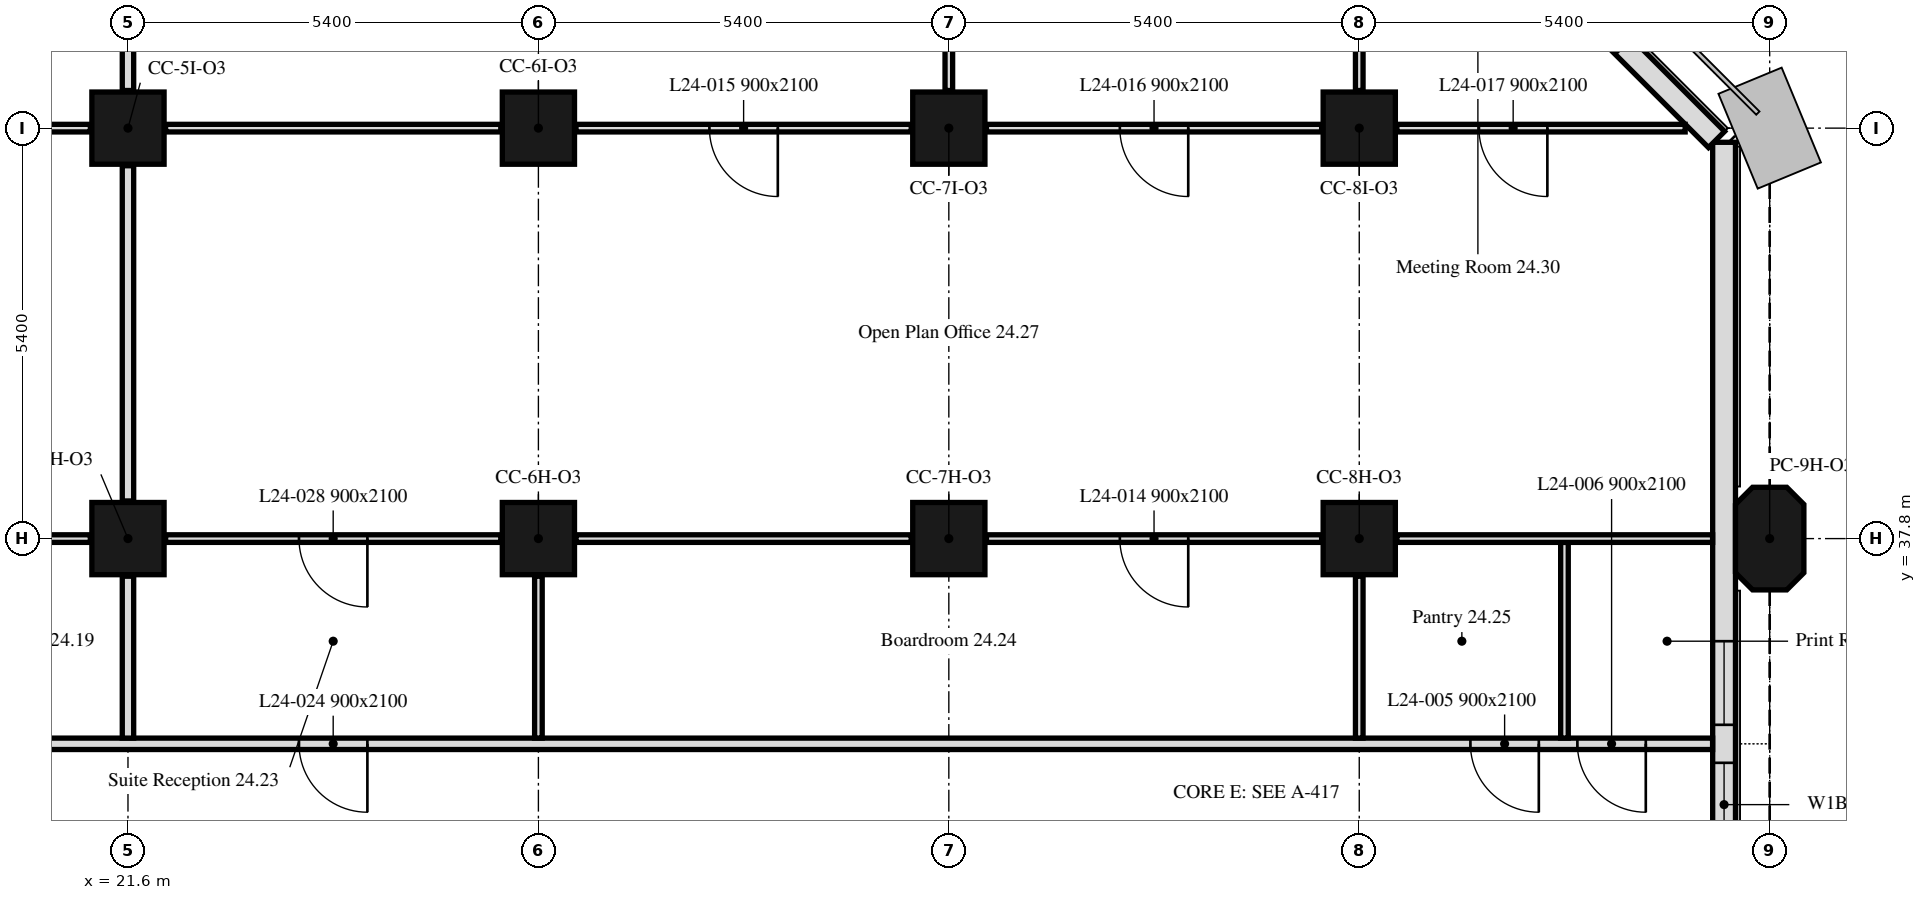
"""IFC4 building model, lengths in metres.
Left out: names, types, materials, properties, quantities, classifications, styles, units other than length and angle.
Written with IfcOpenShell. Run it as: python <this file> out.ifc"""

import sys

from ifc_helpers import new_model, si_unit, direction, frame, frame_2d, origin, origin_2d, place, context, subcontext, project, spatial, polyline, rectangle, outline, extrude, element, fill, save


model = new_model("IFC4")
c1 = context("Model", 3, precision=1e-05, world=origin(), true_north=direction((0.0, 1.0)))
c2 = subcontext(c1, "Body", "Model", "MODEL_VIEW")
j1 = project(units=[si_unit("LENGTHUNIT", "METRE"), si_unit("PLANEANGLEUNIT", "RADIAN")], contexts=[c1])
p1 = place(None, origin())
s1 = spatial("IfcSite", under=j1, at=p1, CompositionType="ELEMENT")
p2 = place(p1, origin())
s2 = spatial("IfcBuilding", under=s1, at=p2, CompositionType="ELEMENT")
p3 = place(p2, frame((0.0, 0.0, 103.0)))
s3 = spatial("IfcBuildingStorey", under=s2, at=p3, CompositionType="ELEMENT", Elevation=103.0)
for number, where, z_axis, x_axis in (
    (1, (21.6, 37.8, 0.0), (0.0, 0.0, 1.0), (1.0, 0.0, 0.0)),
    (2, (27.0, 37.8, 0.0), (0.0, 0.0, 1.0), (1.0, 0.0, 0.0)),
    (3, (32.4, 37.8, 0.0), (0.0, 0.0, 1.0), (1.0, 0.0, 0.0)),
    (4, (37.8, 37.8, 0.0), (0.0, 0.0, 1.0), (1.0, 0.0, 0.0)),
):
    element("IfcColumn", number, at=place(p3, frame(where, z_axis=z_axis, x_axis=x_axis)), inside=s3, PredefinedType="COLUMN", context=c2, shape_type="SweptSolid", body=[
        extrude(rectangle(XDim=0.95, YDim=0.95, at=origin_2d()), origin(), (0.0, 0.0, 1.0), 3.5),
    ])
p4 = place(p3, frame((43.2, 37.8, 0.0), z_axis=(0.0, 0.0, 1.0), x_axis=(0.0, 1.0, 0.0)))
e5 = element("IfcColumn", 5, at=p4, inside=s3, PredefinedType="COLUMN", context=c2, shape_type="SweptSolid", body=[
    extrude(outline(polyline([(-0.45, -0.45), (0.45, -0.45), (0.675, -0.225), (0.675, 0.225), (0.45, 0.45), (-0.45, 0.45), (-0.675, 0.225), (-0.675, -0.225), (-0.45, -0.45)])), origin(), (0.0, 0.0, 1.0), 3.5),
])
for number, where, z_axis, x_axis in (
    (6, (21.6, 43.2, 0.0), (0.0, 0.0, 1.0), (1.0, 0.0, 0.0)),
    (7, (27.0, 43.2, 0.0), (0.0, 0.0, 1.0), (1.0, 0.0, 0.0)),
    (8, (32.4, 43.2, 0.0), (0.0, 0.0, 1.0), (1.0, 0.0, 0.0)),
    (9, (37.8, 43.2, 0.0), (0.0, 0.0, 1.0), (1.0, 0.0, 0.0)),
):
    element("IfcColumn", number, at=place(p3, frame(where, z_axis=z_axis, x_axis=x_axis)), inside=s3, PredefinedType="COLUMN", context=c2, shape_type="SweptSolid", body=[
        extrude(rectangle(XDim=0.95, YDim=0.95, at=origin_2d()), origin(), (0.0, 0.0, 1.0), 3.5),
    ])
p5 = place(p3, frame((42.6, 32.4, 0.0), z_axis=(0.0, 0.0, 1.0), x_axis=(0.0, 1.0, 0.0)))
e10 = element("IfcWall", 10, at=p5, inside=s3, PredefinedType="SOLIDWALL", context=c2, shape_type="SweptSolid", body=[
    extrude(rectangle(XDim=10.614, YDim=0.3, at=frame_2d((5.307, 0.0))), origin(), (0.0, 0.0, 1.0), 3.5),
])
p6 = place(p5, frame((1.35, 0.0, 0.9)))
e11 = element("IfcOpeningElement", 11, at=p6, cuts=e10, PredefinedType="OPENING", context=c2, shape_type="SweptSolid", body=[
    extrude(rectangle(XDim=1.1, YDim=1.7, at=frame_2d((0.55, 0.85))), frame((0.0, 0.16, 0.0), z_axis=(0.0, -1.0, 0.0), x_axis=(1.0, 0.0, 0.0)), (0.0, 0.0, 1.0), 0.32),
])
p7 = place(p5, frame((2.95, 0.0, 0.9)))
e12 = element("IfcOpeningElement", 12, at=p7, cuts=e10, PredefinedType="OPENING", context=c2, shape_type="SweptSolid", body=[
    extrude(rectangle(XDim=1.1, YDim=1.7, at=frame_2d((0.55, 0.85))), frame((0.0, 0.16, 0.0), z_axis=(0.0, -1.0, 0.0), x_axis=(1.0, 0.0, 0.0)), (0.0, 0.0, 1.0), 0.32),
])
p8 = place(p3, frame((42.501, 43.051, 0.0), z_axis=(0.0, 0.0, 1.0), x_axis=(-0.707106781187, 0.707106781187, 0.0)))
e13 = element("IfcWall", 13, at=p8, inside=s3, PredefinedType="SOLIDWALL", context=c2, shape_type="SweptSolid", body=[
    extrude(rectangle(XDim=6.86, YDim=0.3, at=frame_2d((3.43, 0.0))), origin(), (0.0, 0.0, 1.0), 3.5),
])
p9 = place(p8, frame((1.73, 0.0, 0.9)))
e14 = element("IfcOpeningElement", 14, at=p9, cuts=e13, PredefinedType="OPENING", context=c2, shape_type="SweptSolid", body=[
    extrude(rectangle(XDim=3.4, YDim=1.7, at=frame_2d((1.7, 0.85))), frame((0.0, 0.16, 0.0), z_axis=(0.0, -1.0, 0.0), x_axis=(1.0, 0.0, 0.0)), (0.0, 0.0, 1.0), 0.32),
])
p10 = place(p3, frame((42.449, 35.1, 0.0), z_axis=(0.0, 0.0, 1.0), x_axis=(-1.0, 0.0, 0.0)))
e15 = element("IfcWall", 15, at=p10, inside=s3, PredefinedType="PARTITIONING", context=c2, shape_type="SweptSolid", body=[
    extrude(rectangle(XDim=41.698, YDim=0.15, at=frame_2d((20.849, 0.0))), origin(), (0.0, 0.0, 1.0), 2.75),
])
p11 = place(p10, frame((34.519, 0.0, 0.0)))
e16 = element("IfcOpeningElement", 16, at=p11, cuts=e15, PredefinedType="OPENING", context=c2, shape_type="SweptSolid", body=[
    extrude(rectangle(XDim=0.9, YDim=2.1, at=frame_2d((0.45, 1.05))), frame((0.0, 0.075, 0.0), z_axis=(0.0, -1.0, 0.0), x_axis=(1.0, 0.0, 0.0)), (0.0, 0.0, 1.0), 0.15),
])
p12 = place(p10, frame((33.279, 0.0, 0.0)))
e17 = element("IfcOpeningElement", 17, at=p12, cuts=e15, PredefinedType="OPENING", context=c2, shape_type="SweptSolid", body=[
    extrude(rectangle(XDim=0.9, YDim=2.1, at=frame_2d((0.45, 1.05))), frame((0.0, 0.075, 0.0), z_axis=(0.0, -1.0, 0.0), x_axis=(1.0, 0.0, 0.0)), (0.0, 0.0, 1.0), 0.15),
])
p13 = place(p10, frame((23.719, 0.0, 0.0)))
e18 = element("IfcOpeningElement", 18, at=p13, cuts=e15, PredefinedType="OPENING", context=c2, shape_type="SweptSolid", body=[
    extrude(rectangle(XDim=0.9, YDim=2.1, at=frame_2d((0.45, 1.05))), frame((0.0, 0.075, 0.0), z_axis=(0.0, -1.0, 0.0), x_axis=(1.0, 0.0, 0.0)), (0.0, 0.0, 1.0), 0.15),
])
p14 = place(p10, frame((22.479, 0.0, 0.0)))
e19 = element("IfcOpeningElement", 19, at=p14, cuts=e15, PredefinedType="OPENING", context=c2, shape_type="SweptSolid", body=[
    extrude(rectangle(XDim=0.9, YDim=2.1, at=frame_2d((0.45, 1.05))), frame((0.0, 0.075, 0.0), z_axis=(0.0, -1.0, 0.0), x_axis=(1.0, 0.0, 0.0)), (0.0, 0.0, 1.0), 0.15),
])
p15 = place(p10, frame((2.287, 0.0, 0.0)))
e20 = element("IfcOpeningElement", 20, at=p15, cuts=e15, PredefinedType="OPENING", context=c2, shape_type="SweptSolid", body=[
    extrude(rectangle(XDim=0.9, YDim=2.1, at=frame_2d((0.45, 1.05))), frame((0.0, 0.075, 0.0), z_axis=(0.0, -1.0, 0.0), x_axis=(1.0, 0.0, 0.0)), (0.0, 0.0, 1.0), 0.15),
])
p16 = place(p10, frame((0.879, 0.0, 0.0)))
e21 = element("IfcOpeningElement", 21, at=p16, cuts=e15, PredefinedType="OPENING", context=c2, shape_type="SweptSolid", body=[
    extrude(rectangle(XDim=0.9, YDim=2.1, at=frame_2d((0.45, 1.05))), frame((0.0, 0.075, 0.0), z_axis=(0.0, -1.0, 0.0), x_axis=(1.0, 0.0, 0.0)), (0.0, 0.0, 1.0), 0.15),
])
p17 = place(p10, frame((38.624, 0.0, 0.0)))
e22 = element("IfcOpeningElement", 22, at=p17, cuts=e15, PredefinedType="OPENING", context=c2, shape_type="SweptSolid", body=[
    extrude(rectangle(XDim=0.9, YDim=2.1, at=frame_2d((0.45, 1.05))), frame((0.0, 0.075, 0.0), z_axis=(0.0, -1.0, 0.0), x_axis=(1.0, 0.0, 0.0)), (0.0, 0.0, 1.0), 0.15),
])
p18 = place(p10, frame((28.499, 0.0, 0.0)))
e23 = element("IfcOpeningElement", 23, at=p18, cuts=e15, PredefinedType="OPENING", context=c2, shape_type="SweptSolid", body=[
    extrude(rectangle(XDim=0.9, YDim=2.1, at=frame_2d((0.45, 1.05))), frame((0.0, 0.075, 0.0), z_axis=(0.0, -1.0, 0.0), x_axis=(1.0, 0.0, 0.0)), (0.0, 0.0, 1.0), 0.15),
])
p19 = place(p10, frame((17.699, 0.0, 0.0)))
e24 = element("IfcOpeningElement", 24, at=p19, cuts=e15, PredefinedType="OPENING", context=c2, shape_type="SweptSolid", body=[
    extrude(rectangle(XDim=0.9, YDim=2.1, at=frame_2d((0.45, 1.05))), frame((0.0, 0.075, 0.0), z_axis=(0.0, -1.0, 0.0), x_axis=(1.0, 0.0, 0.0)), (0.0, 0.0, 1.0), 0.15),
])
p20 = place(p3, frame((21.6, 35.175, 0.0), z_axis=(0.0, 0.0, 1.0), x_axis=(0.0, 1.0, 0.0)))
e25 = element("IfcWall", 25, at=p20, inside=s3, PredefinedType="PARTITIONING", context=c2, shape_type="SweptSolid", body=[
    extrude(rectangle(XDim=2.13, YDim=0.15, at=frame_2d((1.065, 0.0))), origin(), (0.0, 0.0, 1.0), 2.75),
])
p21 = place(p3, frame((21.105, 37.8, 0.0), z_axis=(0.0, 0.0, 1.0), x_axis=(-1.0, 0.0, 0.0)))
e26 = element("IfcWall", 26, at=p21, inside=s3, PredefinedType="PARTITIONING", context=c2, shape_type="SweptSolid", body=[
    extrude(rectangle(XDim=4.41, YDim=0.1, at=frame_2d((2.205, 0.0))), origin(), (0.0, 0.0, 1.0), 3.5),
])
p22 = place(p3, frame((21.6, 38.295, 0.0), z_axis=(0.0, 0.0, 1.0), x_axis=(0.0, 1.0, 0.0)))
e27 = element("IfcWall", 27, at=p22, inside=s3, PredefinedType="PARTITIONING", context=c2, shape_type="SweptSolid", body=[
    extrude(rectangle(XDim=4.41, YDim=0.15, at=frame_2d((2.205, 0.0))), origin(), (0.0, 0.0, 1.0), 2.75),
])
p23 = place(p3, frame((21.105, 43.2, 0.0), z_axis=(0.0, 0.0, 1.0), x_axis=(-1.0, 0.0, 0.0)))
e28 = element("IfcWall", 28, at=p23, inside=s3, PredefinedType="PARTITIONING", context=c2, shape_type="SweptSolid", body=[
    extrude(rectangle(XDim=4.41, YDim=0.1, at=frame_2d((2.205, 0.0))), origin(), (0.0, 0.0, 1.0), 3.5),
])
p24 = place(p23, frame((1.755, 0.0, 0.0)))
e29 = element("IfcOpeningElement", 29, at=p24, cuts=e28, PredefinedType="OPENING", context=c2, shape_type="SweptSolid", body=[
    extrude(rectangle(XDim=0.9, YDim=2.1, at=frame_2d((0.45, 1.05))), frame((0.0, 0.05, 0.0), z_axis=(0.0, -1.0, 0.0), x_axis=(1.0, 0.0, 0.0)), (0.0, 0.0, 1.0), 0.1),
])
p25 = place(p3, frame((21.6, 43.695, 0.0), z_axis=(0.0, 0.0, 1.0), x_axis=(0.0, 1.0, 0.0)))
e30 = element("IfcWall", 30, at=p25, inside=s3, PredefinedType="PARTITIONING", context=c2, shape_type="SweptSolid", body=[
    extrude(rectangle(XDim=4.154, YDim=0.15, at=frame_2d((2.077, 0.0))), origin(), (0.0, 0.0, 1.0), 2.75),
])
p26 = place(p3, frame((27.0, 35.175, 0.0), z_axis=(0.0, 0.0, 1.0), x_axis=(0.0, 1.0, 0.0)))
e31 = element("IfcWall", 31, at=p26, inside=s3, PredefinedType="PARTITIONING", context=c2, shape_type="SweptSolid", body=[
    extrude(rectangle(XDim=2.13, YDim=0.1, at=frame_2d((1.065, 0.0))), origin(), (0.0, 0.0, 1.0), 2.75),
])
p27 = place(p3, frame((26.505, 37.8, 0.0), z_axis=(0.0, 0.0, 1.0), x_axis=(-1.0, 0.0, 0.0)))
e32 = element("IfcWall", 32, at=p27, inside=s3, PredefinedType="PARTITIONING", context=c2, shape_type="SweptSolid", body=[
    extrude(rectangle(XDim=4.41, YDim=0.1, at=frame_2d((2.205, 0.0))), origin(), (0.0, 0.0, 1.0), 3.5),
])
p28 = place(p27, frame((1.755, 0.0, 0.0)))
e33 = element("IfcOpeningElement", 33, at=p28, cuts=e32, PredefinedType="OPENING", context=c2, shape_type="SweptSolid", body=[
    extrude(rectangle(XDim=0.9, YDim=2.1, at=frame_2d((0.45, 1.05))), frame((0.0, 0.05, 0.0), z_axis=(0.0, -1.0, 0.0), x_axis=(1.0, 0.0, 0.0)), (0.0, 0.0, 1.0), 0.1),
])
p29 = place(p3, frame((37.8, 35.175, 0.0), z_axis=(0.0, 0.0, 1.0), x_axis=(0.0, 1.0, 0.0)))
e34 = element("IfcWall", 34, at=p29, inside=s3, PredefinedType="PARTITIONING", context=c2, shape_type="SweptSolid", body=[
    extrude(rectangle(XDim=2.13, YDim=0.1, at=frame_2d((1.065, 0.0))), origin(), (0.0, 0.0, 1.0), 3.5),
])
p30 = place(p3, frame((37.305, 37.8, 0.0), z_axis=(0.0, 0.0, 1.0), x_axis=(-1.0, 0.0, 0.0)))
e35 = element("IfcWall", 35, at=p30, inside=s3, PredefinedType="PARTITIONING", context=c2, shape_type="SweptSolid", body=[
    extrude(rectangle(XDim=4.41, YDim=0.1, at=frame_2d((2.205, 0.0))), origin(), (0.0, 0.0, 1.0), 3.5),
])
p31 = place(p30, frame((1.755, 0.0, 0.0)))
e36 = element("IfcOpeningElement", 36, at=p31, cuts=e35, PredefinedType="OPENING", context=c2, shape_type="SweptSolid", body=[
    extrude(rectangle(XDim=0.9, YDim=2.1, at=frame_2d((0.45, 1.05))), frame((0.0, 0.05, 0.0), z_axis=(0.0, -1.0, 0.0), x_axis=(1.0, 0.0, 0.0)), (0.0, 0.0, 1.0), 0.1),
])
p32 = place(p3, frame((31.905, 37.8, 0.0), z_axis=(0.0, 0.0, 1.0), x_axis=(-1.0, 0.0, 0.0)))
e37 = element("IfcWall", 37, at=p32, inside=s3, PredefinedType="PARTITIONING", context=c2, shape_type="SweptSolid", body=[
    extrude(rectangle(XDim=4.41, YDim=0.1, at=frame_2d((2.205, 0.0))), origin(), (0.0, 0.0, 1.0), 3.5),
])
p33 = place(p3, frame((40.5, 35.175, 0.0), z_axis=(0.0, 0.0, 1.0), x_axis=(0.0, 1.0, 0.0)))
e38 = element("IfcWall", 38, at=p33, inside=s3, PredefinedType="PARTITIONING", context=c2, shape_type="SweptSolid", body=[
    extrude(rectangle(XDim=2.575, YDim=0.1, at=frame_2d((1.288, 0.0))), origin(), (0.0, 0.0, 1.0), 3.5),
])
p34 = place(p3, frame((42.449, 37.8, 0.0), z_axis=(0.0, 0.0, 1.0), x_axis=(-1.0, 0.0, 0.0)))
e39 = element("IfcWall", 39, at=p34, inside=s3, PredefinedType="PARTITIONING", context=c2, shape_type="SweptSolid", body=[
    extrude(rectangle(XDim=4.154, YDim=0.1, at=frame_2d((2.077, 0.0))), origin(), (0.0, 0.0, 1.0), 3.5),
])
p35 = place(p3, frame((42.088, 43.2, 0.0), z_axis=(0.0, 0.0, 1.0), x_axis=(-1.0, 0.0, 0.0)))
e40 = element("IfcWall", 40, at=p35, inside=s3, PredefinedType="PARTITIONING", context=c2, shape_type="SweptSolid", body=[
    extrude(rectangle(XDim=3.793, YDim=0.1, at=frame_2d((1.896, 0.0))), origin(), (0.0, 0.0, 1.0), 3.5),
])
p36 = place(p35, frame((1.813, 0.0, 0.0)))
e41 = element("IfcOpeningElement", 41, at=p36, cuts=e40, PredefinedType="OPENING", context=c2, shape_type="SweptSolid", body=[
    extrude(rectangle(XDim=0.9, YDim=2.1, at=frame_2d((0.45, 1.05))), frame((0.0, 0.05, 0.0), z_axis=(0.0, -1.0, 0.0), x_axis=(1.0, 0.0, 0.0)), (0.0, 0.0, 1.0), 0.1),
])
p37 = place(p3, frame((37.305, 43.2, 0.0), z_axis=(0.0, 0.0, 1.0), x_axis=(-1.0, 0.0, 0.0)))
e42 = element("IfcWall", 42, at=p37, inside=s3, PredefinedType="PARTITIONING", context=c2, shape_type="SweptSolid", body=[
    extrude(rectangle(XDim=4.41, YDim=0.1, at=frame_2d((2.205, 0.0))), origin(), (0.0, 0.0, 1.0), 3.5),
])
p38 = place(p37, frame((1.755, 0.0, 0.0)))
e43 = element("IfcOpeningElement", 43, at=p38, cuts=e42, PredefinedType="OPENING", context=c2, shape_type="SweptSolid", body=[
    extrude(rectangle(XDim=0.9, YDim=2.1, at=frame_2d((0.45, 1.05))), frame((0.0, 0.05, 0.0), z_axis=(0.0, -1.0, 0.0), x_axis=(1.0, 0.0, 0.0)), (0.0, 0.0, 1.0), 0.1),
])
p39 = place(p3, frame((31.905, 43.2, 0.0), z_axis=(0.0, 0.0, 1.0), x_axis=(-1.0, 0.0, 0.0)))
e44 = element("IfcWall", 44, at=p39, inside=s3, PredefinedType="PARTITIONING", context=c2, shape_type="SweptSolid", body=[
    extrude(rectangle(XDim=4.41, YDim=0.1, at=frame_2d((2.205, 0.0))), origin(), (0.0, 0.0, 1.0), 3.5),
])
p40 = place(p39, frame((1.755, 0.0, 0.0)))
e45 = element("IfcOpeningElement", 45, at=p40, cuts=e44, PredefinedType="OPENING", context=c2, shape_type="SweptSolid", body=[
    extrude(rectangle(XDim=0.9, YDim=2.1, at=frame_2d((0.45, 1.05))), frame((0.0, 0.05, 0.0), z_axis=(0.0, -1.0, 0.0), x_axis=(1.0, 0.0, 0.0)), (0.0, 0.0, 1.0), 0.1),
])
p41 = place(p3, frame((26.505, 43.2, 0.0), z_axis=(0.0, 0.0, 1.0), x_axis=(-1.0, 0.0, 0.0)))
e46 = element("IfcWall", 46, at=p41, inside=s3, PredefinedType="PARTITIONING", context=c2, shape_type="SweptSolid", body=[
    extrude(rectangle(XDim=4.41, YDim=0.1, at=frame_2d((2.205, 0.0))), origin(), (0.0, 0.0, 1.0), 3.5),
])
p42 = place(p3, frame((32.4, 43.695, 0.0), z_axis=(0.0, 0.0, 1.0), x_axis=(0.0, 1.0, 0.0)))
e47 = element("IfcWall", 47, at=p42, inside=s3, PredefinedType="PARTITIONING", context=c2, shape_type="SweptSolid", body=[
    extrude(rectangle(XDim=4.154, YDim=0.1, at=frame_2d((2.077, 0.0))), origin(), (0.0, 0.0, 1.0), 2.75),
])
p43 = place(p3, frame((37.8, 43.695, 0.0), z_axis=(0.0, 0.0, 1.0), x_axis=(0.0, 1.0, 0.0)))
e48 = element("IfcWall", 48, at=p43, inside=s3, PredefinedType="PARTITIONING", context=c2, shape_type="SweptSolid", body=[
    extrude(rectangle(XDim=3.793, YDim=0.1, at=frame_2d((1.896, 0.0))), origin(), (0.0, 0.0, 1.0), 3.5),
])
p44 = place(p6, origin())
e49 = element("IfcWindow", 49, at=p44, inside=s3, PartitioningType="SINGLE_PANEL", PredefinedType="WINDOW", context=c2, shape_type="SweptSolid", body=[
    extrude(rectangle(XDim=1.1, YDim=1.7, at=frame_2d((0.55, 0.85))), frame((0.0, 0.03, 0.0), z_axis=(0.0, -1.0, 0.0), x_axis=(1.0, 0.0, 0.0)), (0.0, 0.0, 1.0), 0.06),
])
fill(e11, e49)
p45 = place(p7, origin())
e50 = element("IfcWindow", 50, at=p45, inside=s3, PartitioningType="SINGLE_PANEL", PredefinedType="WINDOW", context=c2, shape_type="SweptSolid", body=[
    extrude(rectangle(XDim=1.1, YDim=1.7, at=frame_2d((0.55, 0.85))), frame((0.0, 0.03, 0.0), z_axis=(0.0, -1.0, 0.0), x_axis=(1.0, 0.0, 0.0)), (0.0, 0.0, 1.0), 0.06),
])
fill(e12, e50)
p46 = place(p15, origin())
e51 = element("IfcDoor", 51, at=p46, inside=s3, OperationType="SINGLE_SWING_LEFT", PredefinedType="DOOR", context=c2, shape_type="SweptSolid", body=[
    extrude(rectangle(XDim=0.9, YDim=2.1, at=frame_2d((0.45, 1.05))), frame((0.0, 0.025, 0.0), z_axis=(0.0, -1.0, 0.0), x_axis=(1.0, 0.0, 0.0)), (0.0, 0.0, 1.0), 0.05),
])
fill(e20, e51)
p47 = place(p16, origin())
e52 = element("IfcDoor", 52, at=p47, inside=s3, OperationType="SINGLE_SWING_LEFT", PredefinedType="DOOR", context=c2, shape_type="SweptSolid", body=[
    extrude(rectangle(XDim=0.9, YDim=2.1, at=frame_2d((0.45, 1.05))), frame((0.0, 0.025, 0.0), z_axis=(0.0, -1.0, 0.0), x_axis=(1.0, 0.0, 0.0)), (0.0, 0.0, 1.0), 0.05),
])
fill(e21, e52)
p48 = place(p31, origin())
e53 = element("IfcDoor", 53, at=p48, inside=s3, OperationType="SINGLE_SWING_LEFT", PredefinedType="DOOR", context=c2, shape_type="SweptSolid", body=[
    extrude(rectangle(XDim=0.9, YDim=2.1, at=frame_2d((0.45, 1.05))), frame((0.0, 0.025, 0.0), z_axis=(0.0, -1.0, 0.0), x_axis=(1.0, 0.0, 0.0)), (0.0, 0.0, 1.0), 0.05),
])
fill(e36, e53)
p49 = place(p40, origin())
e54 = element("IfcDoor", 54, at=p49, inside=s3, OperationType="SINGLE_SWING_LEFT", PredefinedType="DOOR", context=c2, shape_type="SweptSolid", body=[
    extrude(rectangle(XDim=0.9, YDim=2.1, at=frame_2d((0.45, 1.05))), frame((0.0, 0.025, 0.0), z_axis=(0.0, -1.0, 0.0), x_axis=(1.0, 0.0, 0.0)), (0.0, 0.0, 1.0), 0.05),
])
fill(e45, e54)
p50 = place(p38, origin())
e55 = element("IfcDoor", 55, at=p50, inside=s3, OperationType="SINGLE_SWING_LEFT", PredefinedType="DOOR", context=c2, shape_type="SweptSolid", body=[
    extrude(rectangle(XDim=0.9, YDim=2.1, at=frame_2d((0.45, 1.05))), frame((0.0, 0.025, 0.0), z_axis=(0.0, -1.0, 0.0), x_axis=(1.0, 0.0, 0.0)), (0.0, 0.0, 1.0), 0.05),
])
fill(e43, e55)
p51 = place(p36, origin())
e56 = element("IfcDoor", 56, at=p51, inside=s3, OperationType="SINGLE_SWING_LEFT", PredefinedType="DOOR", context=c2, shape_type="SweptSolid", body=[
    extrude(rectangle(XDim=0.9, YDim=2.1, at=frame_2d((0.45, 1.05))), frame((0.0, 0.025, 0.0), z_axis=(0.0, -1.0, 0.0), x_axis=(1.0, 0.0, 0.0)), (0.0, 0.0, 1.0), 0.05),
])
fill(e41, e56)
p52 = place(p19, origin())
e57 = element("IfcDoor", 57, at=p52, inside=s3, OperationType="SINGLE_SWING_LEFT", PredefinedType="DOOR", context=c2, shape_type="SweptSolid", body=[
    extrude(rectangle(XDim=0.9, YDim=2.1, at=frame_2d((0.45, 1.05))), frame((0.0, 0.025, 0.0), z_axis=(0.0, -1.0, 0.0), x_axis=(1.0, 0.0, 0.0)), (0.0, 0.0, 1.0), 0.05),
])
fill(e24, e57)
p53 = place(p28, origin())
e58 = element("IfcDoor", 58, at=p53, inside=s3, OperationType="SINGLE_SWING_RIGHT", PredefinedType="DOOR", context=c2, shape_type="SweptSolid", body=[
    extrude(rectangle(XDim=0.9, YDim=2.1, at=frame_2d((0.45, 1.05))), frame((0.0, 0.025, 0.0), z_axis=(0.0, -1.0, 0.0), x_axis=(1.0, 0.0, 0.0)), (0.0, 0.0, 1.0), 0.05),
])
fill(e33, e58)
save(model, sys.argv[1])
